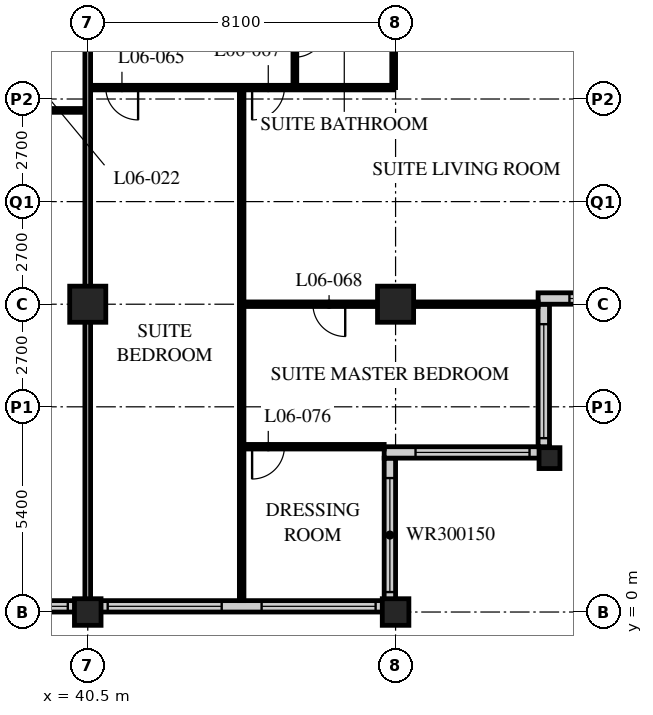
"""IFC4 building model, lengths in metres.
Left out: names, types, materials, properties, quantities, classifications, styles, units other than length and angle.
Written with IfcOpenShell. Run it as: python <this file> out.ifc"""

import sys

from ifc_helpers import new_model, si_unit, direction, frame, frame_2d, origin, origin_2d, place, context, subcontext, project, spatial, rectangle, hollow_rectangle, extrude, element, fill, save


model = new_model("IFC4")
c1 = context("Model", 3, precision=1e-05, world=origin(), true_north=direction((0.0, 1.0)))
c2 = subcontext(c1, "Body", "Model", "MODEL_VIEW")
j1 = project(units=[si_unit("LENGTHUNIT", "METRE"), si_unit("PLANEANGLEUNIT", "RADIAN")], contexts=[c1])
p1 = place(None, origin())
s1 = spatial("IfcSite", under=j1, at=p1, CompositionType="ELEMENT")
p2 = place(p1, origin())
s2 = spatial("IfcBuilding", under=s1, at=p2, CompositionType="ELEMENT")
p3 = place(p2, frame((0.0, 0.0, 33.0)))
s3 = spatial("IfcBuildingStorey", under=s2, at=p3, CompositionType="ELEMENT", Elevation=33.0)
p4 = place(p3, frame((40.5, 0.0, 0.0), z_axis=(0.0, 0.0, 1.0), x_axis=(1.0, 0.0, 0.0)))
e1 = element("IfcColumn", 1, at=p4, inside=s3, PredefinedType="COLUMN", context=c2, shape_type="SweptSolid", body=[
    extrude(hollow_rectangle(XDim=0.7, YDim=0.7, WallThickness=0.06, at=origin_2d()), origin(), (0.0, 0.0, 1.0), 3.4),
])
p5 = place(p3, frame((40.5, 8.1, 0.0), z_axis=(0.0, 0.0, 1.0), x_axis=(1.0, 0.0, 0.0)))
e2 = element("IfcColumn", 2, at=p5, inside=s3, PredefinedType="COLUMN", context=c2, shape_type="SweptSolid", body=[
    extrude(hollow_rectangle(XDim=0.95, YDim=0.95, WallThickness=0.095, at=origin_2d()), origin(), (0.0, 0.0, 1.0), 3.4),
])
p6 = place(p3, frame((48.6, 0.0, 0.0), z_axis=(0.0, 0.0, 1.0), x_axis=(1.0, 0.0, 0.0)))
e3 = element("IfcColumn", 3, at=p6, inside=s3, PredefinedType="COLUMN", context=c2, shape_type="SweptSolid", body=[
    extrude(hollow_rectangle(XDim=0.7, YDim=0.7, WallThickness=0.06, at=origin_2d()), origin(), (0.0, 0.0, 1.0), 3.4),
])
p7 = place(p3, frame((48.6, 8.1, 0.0), z_axis=(0.0, 0.0, 1.0), x_axis=(1.0, 0.0, 0.0)))
e4 = element("IfcColumn", 4, at=p7, inside=s3, PredefinedType="COLUMN", context=c2, shape_type="SweptSolid", body=[
    extrude(hollow_rectangle(XDim=0.95, YDim=0.95, WallThickness=0.095, at=origin_2d()), origin(), (0.0, 0.0, 1.0), 3.4),
])
p8 = place(p3, frame((52.65, 4.05, 0.0), z_axis=(0.0, 0.0, 1.0), x_axis=(1.0, 0.0, 0.0)))
e5 = element("IfcColumn", 5, at=p8, inside=s3, PredefinedType="COLUMN", context=c2, shape_type="SweptSolid", body=[
    extrude(hollow_rectangle(XDim=0.55, YDim=0.55, WallThickness=0.05, at=origin_2d()), origin(), (0.0, 0.0, 1.0), 3.4),
])
p9 = place(p3, frame((8.4, 0.15, 0.0), z_axis=(0.0, 0.0, 1.0), x_axis=(1.0, 0.0, 0.0)))
e6 = element("IfcWall", 6, at=p9, inside=s3, PredefinedType="SOLIDWALL", context=c2, shape_type="SweptSolid", body=[
    extrude(rectangle(XDim=40.2, YDim=0.3, at=frame_2d((20.1, 0.0))), origin(), (0.0, 0.0, 1.0), 3.19),
])
p10 = place(p9, frame((0.225, 0.0, 0.9)))
e7 = element("IfcOpeningElement", 7, at=p10, cuts=e6, PredefinedType="OPENING", context=c2, shape_type="SweptSolid", body=[
    extrude(rectangle(XDim=3.0, YDim=2.0, at=frame_2d((1.5, 1.0))), frame((0.0, 0.16, 0.0), z_axis=(0.0, -1.0, 0.0), x_axis=(1.0, 0.0, 0.0)), (0.0, 0.0, 1.0), 0.32),
])
p11 = place(p9, frame((4.275, 0.0, 0.9)))
e8 = element("IfcOpeningElement", 8, at=p11, cuts=e6, PredefinedType="OPENING", context=c2, shape_type="SweptSolid", body=[
    extrude(rectangle(XDim=3.0, YDim=2.0, at=frame_2d((1.5, 1.0))), frame((0.0, 0.16, 0.0), z_axis=(0.0, -1.0, 0.0), x_axis=(1.0, 0.0, 0.0)), (0.0, 0.0, 1.0), 0.32),
])
p12 = place(p9, frame((8.325, 0.0, 0.9)))
e9 = element("IfcOpeningElement", 9, at=p12, cuts=e6, PredefinedType="OPENING", context=c2, shape_type="SweptSolid", body=[
    extrude(rectangle(XDim=3.0, YDim=2.0, at=frame_2d((1.5, 1.0))), frame((0.0, 0.16, 0.0), z_axis=(0.0, -1.0, 0.0), x_axis=(1.0, 0.0, 0.0)), (0.0, 0.0, 1.0), 0.32),
])
p13 = place(p9, frame((12.375, 0.0, 0.9)))
e10 = element("IfcOpeningElement", 10, at=p13, cuts=e6, PredefinedType="OPENING", context=c2, shape_type="SweptSolid", body=[
    extrude(rectangle(XDim=3.0, YDim=2.0, at=frame_2d((1.5, 1.0))), frame((0.0, 0.16, 0.0), z_axis=(0.0, -1.0, 0.0), x_axis=(1.0, 0.0, 0.0)), (0.0, 0.0, 1.0), 0.32),
])
p14 = place(p9, frame((16.425, 0.0, 0.9)))
e11 = element("IfcOpeningElement", 11, at=p14, cuts=e6, PredefinedType="OPENING", context=c2, shape_type="SweptSolid", body=[
    extrude(rectangle(XDim=3.0, YDim=2.0, at=frame_2d((1.5, 1.0))), frame((0.0, 0.16, 0.0), z_axis=(0.0, -1.0, 0.0), x_axis=(1.0, 0.0, 0.0)), (0.0, 0.0, 1.0), 0.32),
])
p15 = place(p9, frame((20.475, 0.0, 0.9)))
e12 = element("IfcOpeningElement", 12, at=p15, cuts=e6, PredefinedType="OPENING", context=c2, shape_type="SweptSolid", body=[
    extrude(rectangle(XDim=3.0, YDim=2.0, at=frame_2d((1.5, 1.0))), frame((0.0, 0.16, 0.0), z_axis=(0.0, -1.0, 0.0), x_axis=(1.0, 0.0, 0.0)), (0.0, 0.0, 1.0), 0.32),
])
p16 = place(p9, frame((24.525, 0.0, 0.9)))
e13 = element("IfcOpeningElement", 13, at=p16, cuts=e6, PredefinedType="OPENING", context=c2, shape_type="SweptSolid", body=[
    extrude(rectangle(XDim=3.0, YDim=2.0, at=frame_2d((1.5, 1.0))), frame((0.0, 0.16, 0.0), z_axis=(0.0, -1.0, 0.0), x_axis=(1.0, 0.0, 0.0)), (0.0, 0.0, 1.0), 0.32),
])
p17 = place(p9, frame((28.575, 0.0, 0.9)))
e14 = element("IfcOpeningElement", 14, at=p17, cuts=e6, PredefinedType="OPENING", context=c2, shape_type="SweptSolid", body=[
    extrude(rectangle(XDim=3.0, YDim=2.0, at=frame_2d((1.5, 1.0))), frame((0.0, 0.16, 0.0), z_axis=(0.0, -1.0, 0.0), x_axis=(1.0, 0.0, 0.0)), (0.0, 0.0, 1.0), 0.32),
])
p18 = place(p9, frame((32.625, 0.0, 0.9)))
e15 = element("IfcOpeningElement", 15, at=p18, cuts=e6, PredefinedType="OPENING", context=c2, shape_type="SweptSolid", body=[
    extrude(rectangle(XDim=3.0, YDim=2.0, at=frame_2d((1.5, 1.0))), frame((0.0, 0.16, 0.0), z_axis=(0.0, -1.0, 0.0), x_axis=(1.0, 0.0, 0.0)), (0.0, 0.0, 1.0), 0.32),
])
p19 = place(p9, frame((36.675, 0.0, 0.9)))
e16 = element("IfcOpeningElement", 16, at=p19, cuts=e6, PredefinedType="OPENING", context=c2, shape_type="SweptSolid", body=[
    extrude(rectangle(XDim=3.0, YDim=2.0, at=frame_2d((1.5, 1.0))), frame((0.0, 0.16, 0.0), z_axis=(0.0, -1.0, 0.0), x_axis=(1.0, 0.0, 0.0)), (0.0, 0.0, 1.0), 0.32),
])
p20 = place(p3, frame((48.45, 0.3, 0.0), z_axis=(0.0, 0.0, 1.0), x_axis=(0.0, 1.0, 0.0)))
e17 = element("IfcWall", 17, at=p20, inside=s3, PredefinedType="SOLIDWALL", context=c2, shape_type="SweptSolid", body=[
    extrude(rectangle(XDim=3.75, YDim=0.3, at=frame_2d((1.875, 0.0))), origin(), (0.0, 0.0, 1.0), 3.19),
])
p21 = place(p20, frame((0.225, 0.0, 0.9)))
e18 = element("IfcOpeningElement", 18, at=p21, cuts=e17, PredefinedType="OPENING", context=c2, shape_type="SweptSolid", body=[
    extrude(rectangle(XDim=3.0, YDim=1.5, at=frame_2d((1.5, 0.75))), frame((0.0, 0.16, 0.0), z_axis=(0.0, -1.0, 0.0), x_axis=(1.0, 0.0, 0.0)), (0.0, 0.0, 1.0), 0.32),
])
p22 = place(p3, frame((48.3, 4.2, 0.0), z_axis=(0.0, 0.0, 1.0), x_axis=(1.0, 0.0, 0.0)))
e19 = element("IfcWall", 19, at=p22, inside=s3, PredefinedType="SOLIDWALL", context=c2, shape_type="SweptSolid", body=[
    extrude(rectangle(XDim=4.35, YDim=0.3, at=frame_2d((2.175, 0.0))), origin(), (0.0, 0.0, 1.0), 3.19),
])
p23 = place(p22, frame((0.825, 0.0, 0.9)))
e20 = element("IfcOpeningElement", 20, at=p23, cuts=e19, PredefinedType="OPENING", context=c2, shape_type="SweptSolid", body=[
    extrude(rectangle(XDim=3.0, YDim=1.5, at=frame_2d((1.5, 0.75))), frame((0.0, 0.16, 0.0), z_axis=(0.0, -1.0, 0.0), x_axis=(1.0, 0.0, 0.0)), (0.0, 0.0, 1.0), 0.32),
])
p24 = place(p3, frame((52.5, 4.35, 0.0), z_axis=(0.0, 0.0, 1.0), x_axis=(0.0, 1.0, 0.0)))
e21 = element("IfcWall", 21, at=p24, inside=s3, PredefinedType="SOLIDWALL", context=c2, shape_type="SweptSolid", body=[
    extrude(rectangle(XDim=3.75, YDim=0.3, at=frame_2d((1.875, 0.0))), origin(), (0.0, 0.0, 1.0), 3.19),
])
p25 = place(p24, frame((0.225, 0.0, 0.9)))
e22 = element("IfcOpeningElement", 22, at=p25, cuts=e21, PredefinedType="OPENING", context=c2, shape_type="SweptSolid", body=[
    extrude(rectangle(XDim=3.0, YDim=1.5, at=frame_2d((1.5, 0.75))), frame((0.0, 0.16, 0.0), z_axis=(0.0, -1.0, 0.0), x_axis=(1.0, 0.0, 0.0)), (0.0, 0.0, 1.0), 0.32),
])
p26 = place(p3, frame((52.35, 8.25, 0.0), z_axis=(0.0, 0.0, 1.0), x_axis=(1.0, 0.0, 0.0)))
e23 = element("IfcWall", 23, at=p26, inside=s3, PredefinedType="SOLIDWALL", context=c2, shape_type="SweptSolid", body=[
    extrude(rectangle(XDim=4.35, YDim=0.3, at=frame_2d((2.175, 0.0))), origin(), (0.0, 0.0, 1.0), 3.19),
])
p27 = place(p26, frame((0.825, 0.0, 0.9)))
e24 = element("IfcOpeningElement", 24, at=p27, cuts=e23, PredefinedType="OPENING", context=c2, shape_type="SweptSolid", body=[
    extrude(rectangle(XDim=3.0, YDim=1.5, at=frame_2d((1.5, 0.75))), frame((0.0, 0.16, 0.0), z_axis=(0.0, -1.0, 0.0), x_axis=(1.0, 0.0, 0.0)), (0.0, 0.0, 1.0), 0.32),
])
p28 = place(p3, frame((37.9, 13.2, 0.0), z_axis=(0.0, 0.0, 1.0), x_axis=(1.0, 0.0, 0.0)))
e25 = element("IfcWall", 25, at=p28, inside=s3, PredefinedType="PARTITIONING", context=c2, shape_type="SweptSolid", body=[
    extrude(rectangle(XDim=2.6, YDim=0.1, at=frame_2d((1.3, 0.0))), origin(), (0.0, 0.0, 1.0), 3.19),
])
p29 = place(p3, frame((40.5, 13.8, 0.0), z_axis=(0.0, 0.0, 1.0), x_axis=(1.0, 0.0, 0.0)))
e26 = element("IfcWall", 26, at=p29, inside=s3, PredefinedType="PARTITIONING", context=c2, shape_type="SweptSolid", body=[
    extrude(rectangle(XDim=8.05, YDim=0.12, at=frame_2d((4.025, 0.0))), origin(), (0.0, 0.0, 1.0), 3.19),
])
p30 = place(p29, frame((0.475, 0.0, 0.0)))
e27 = element("IfcOpeningElement", 27, at=p30, cuts=e26, PredefinedType="OPENING", context=c2, shape_type="SweptSolid", body=[
    extrude(rectangle(XDim=0.85, YDim=2.1, at=frame_2d((0.425, 1.05))), frame((0.0, 0.07, 0.0), z_axis=(0.0, -1.0, 0.0), x_axis=(1.0, 0.0, 0.0)), (0.0, 0.0, 1.0), 0.14),
])
p31 = place(p29, frame((4.325, 0.0, 0.0)))
e28 = element("IfcOpeningElement", 28, at=p31, cuts=e26, PredefinedType="OPENING", context=c2, shape_type="SweptSolid", body=[
    extrude(rectangle(XDim=0.85, YDim=2.1, at=frame_2d((0.425, 1.05))), frame((0.0, 0.07, 0.0), z_axis=(0.0, -1.0, 0.0), x_axis=(1.0, 0.0, 0.0)), (0.0, 0.0, 1.0), 0.14),
])
p32 = place(p3, frame((45.95, 16.2, 0.0), z_axis=(0.0, 0.0, 1.0), x_axis=(0.0, -1.0, 0.0)))
e29 = element("IfcWall", 29, at=p32, inside=s3, PredefinedType="PARTITIONING", context=c2, shape_type="SweptSolid", body=[
    extrude(rectangle(XDim=2.4, YDim=0.1, at=frame_2d((1.2, 0.0))), origin(), (0.0, 0.0, 1.0), 3.19),
])
p33 = place(p32, frame((0.8, 0.0, 0.0)))
e30 = element("IfcOpeningElement", 30, at=p33, cuts=e29, PredefinedType="OPENING", context=c2, shape_type="SweptSolid", body=[
    extrude(rectangle(XDim=0.8, YDim=2.1, at=frame_2d((0.4, 1.05))), frame((0.0, 0.06, 0.0), z_axis=(0.0, -1.0, 0.0), x_axis=(1.0, 0.0, 0.0)), (0.0, 0.0, 1.0), 0.12),
])
p34 = place(p3, frame((48.55, 16.2, 0.0), z_axis=(0.0, 0.0, 1.0), x_axis=(0.0, -1.0, 0.0)))
e31 = element("IfcWall", 31, at=p34, inside=s3, PredefinedType="PARTITIONING", context=c2, shape_type="SweptSolid", body=[
    extrude(rectangle(XDim=2.4, YDim=0.1, at=frame_2d((1.2, 0.0))), origin(), (0.0, 0.0, 1.0), 2.578),
])
p35 = place(p3, frame((44.55, 13.8, 0.0), z_axis=(0.0, 0.0, 1.0), x_axis=(0.0, -1.0, 0.0)))
e32 = element("IfcWall", 32, at=p35, inside=s3, PredefinedType="PARTITIONING", context=c2, shape_type="SweptSolid", body=[
    extrude(rectangle(XDim=13.5, YDim=0.12, at=frame_2d((6.75, 0.0))), origin(), (0.0, 0.0, 1.0), 3.19),
])
p36 = place(p3, frame((44.55, 8.1, 0.0), z_axis=(0.0, 0.0, 1.0), x_axis=(1.0, 0.0, 0.0)))
e33 = element("IfcWall", 33, at=p36, inside=s3, PredefinedType="PARTITIONING", context=c2, shape_type="SweptSolid", body=[
    extrude(rectangle(XDim=7.8, YDim=0.12, at=frame_2d((3.9, 0.0))), origin(), (0.0, 0.0, 1.0), 2.578),
])
p37 = place(p36, frame((1.875, 0.0, 0.0)))
e34 = element("IfcOpeningElement", 34, at=p37, cuts=e33, PredefinedType="OPENING", context=c2, shape_type="SweptSolid", body=[
    extrude(rectangle(XDim=0.85, YDim=2.1, at=frame_2d((0.425, 1.05))), frame((0.0, 0.07, 0.0), z_axis=(0.0, -1.0, 0.0), x_axis=(1.0, 0.0, 0.0)), (0.0, 0.0, 1.0), 0.14),
])
p38 = place(p3, frame((40.5, 16.2, 0.0), z_axis=(0.0, 0.0, 1.0), x_axis=(0.0, -1.0, 0.0)))
e35 = element("IfcWall", 35, at=p38, inside=s3, PredefinedType="PARTITIONING", context=c2, shape_type="SweptSolid", body=[
    extrude(rectangle(XDim=15.9, YDim=0.15, at=frame_2d((7.95, 0.0))), origin(), (0.0, 0.0, 1.0), 2.578),
])
p39 = place(p3, frame((44.55, 4.35, 0.0), z_axis=(0.0, 0.0, 1.0), x_axis=(1.0, 0.0, 0.0)))
e36 = element("IfcWall", 36, at=p39, inside=s3, PredefinedType="PARTITIONING", context=c2, shape_type="SweptSolid", body=[
    extrude(rectangle(XDim=3.75, YDim=0.12, at=frame_2d((1.875, 0.0))), origin(), (0.0, 0.0, 1.0), 3.19),
])
p40 = place(p39, frame((0.275, 0.0, 0.0)))
e37 = element("IfcOpeningElement", 37, at=p40, cuts=e36, PredefinedType="OPENING", context=c2, shape_type="SweptSolid", body=[
    extrude(rectangle(XDim=0.85, YDim=2.1, at=frame_2d((0.425, 1.05))), frame((0.0, 0.07, 0.0), z_axis=(0.0, -1.0, 0.0), x_axis=(1.0, 0.0, 0.0)), (0.0, 0.0, 1.0), 0.14),
])
p41 = place(p17, origin())
e38 = element("IfcWindow", 38, at=p41, inside=s3, PartitioningType="SINGLE_PANEL", PredefinedType="WINDOW", context=c2, shape_type="SweptSolid", body=[
    extrude(rectangle(XDim=3.0, YDim=2.0, at=frame_2d((1.5, 1.0))), frame((0.0, 0.03, 0.0), z_axis=(0.0, -1.0, 0.0), x_axis=(1.0, 0.0, 0.0)), (0.0, 0.0, 1.0), 0.06),
])
fill(e14, e38)
p42 = place(p18, origin())
e39 = element("IfcWindow", 39, at=p42, inside=s3, PartitioningType="SINGLE_PANEL", PredefinedType="WINDOW", context=c2, shape_type="SweptSolid", body=[
    extrude(rectangle(XDim=3.0, YDim=2.0, at=frame_2d((1.5, 1.0))), frame((0.0, 0.03, 0.0), z_axis=(0.0, -1.0, 0.0), x_axis=(1.0, 0.0, 0.0)), (0.0, 0.0, 1.0), 0.06),
])
fill(e15, e39)
p43 = place(p19, origin())
e40 = element("IfcWindow", 40, at=p43, inside=s3, PartitioningType="SINGLE_PANEL", PredefinedType="WINDOW", context=c2, shape_type="SweptSolid", body=[
    extrude(rectangle(XDim=3.0, YDim=2.0, at=frame_2d((1.5, 1.0))), frame((0.0, 0.03, 0.0), z_axis=(0.0, -1.0, 0.0), x_axis=(1.0, 0.0, 0.0)), (0.0, 0.0, 1.0), 0.06),
])
fill(e16, e40)
p44 = place(p21, origin())
e41 = element("IfcWindow", 41, at=p44, inside=s3, PartitioningType="SINGLE_PANEL", PredefinedType="WINDOW", context=c2, shape_type="SweptSolid", body=[
    extrude(rectangle(XDim=3.0, YDim=1.5, at=frame_2d((1.5, 0.75))), frame((0.0, 0.03, 0.0), z_axis=(0.0, -1.0, 0.0), x_axis=(1.0, 0.0, 0.0)), (0.0, 0.0, 1.0), 0.06),
])
fill(e18, e41)
p45 = place(p23, origin())
e42 = element("IfcWindow", 42, at=p45, inside=s3, PartitioningType="SINGLE_PANEL", PredefinedType="WINDOW", context=c2, shape_type="SweptSolid", body=[
    extrude(rectangle(XDim=3.0, YDim=1.5, at=frame_2d((1.5, 0.75))), frame((0.0, 0.03, 0.0), z_axis=(0.0, -1.0, 0.0), x_axis=(1.0, 0.0, 0.0)), (0.0, 0.0, 1.0), 0.06),
])
fill(e20, e42)
p46 = place(p25, origin())
e43 = element("IfcWindow", 43, at=p46, inside=s3, PartitioningType="SINGLE_PANEL", PredefinedType="WINDOW", context=c2, shape_type="SweptSolid", body=[
    extrude(rectangle(XDim=3.0, YDim=1.5, at=frame_2d((1.5, 0.75))), frame((0.0, 0.03, 0.0), z_axis=(0.0, -1.0, 0.0), x_axis=(1.0, 0.0, 0.0)), (0.0, 0.0, 1.0), 0.06),
])
fill(e22, e43)
p47 = place(p27, origin())
e44 = element("IfcWindow", 44, at=p47, inside=s3, PartitioningType="SINGLE_PANEL", PredefinedType="WINDOW", context=c2, shape_type="SweptSolid", body=[
    extrude(rectangle(XDim=3.0, YDim=1.5, at=frame_2d((1.5, 0.75))), frame((0.0, 0.03, 0.0), z_axis=(0.0, -1.0, 0.0), x_axis=(1.0, 0.0, 0.0)), (0.0, 0.0, 1.0), 0.06),
])
fill(e24, e44)
p48 = place(p30, origin())
e45 = element("IfcDoor", 45, at=p48, inside=s3, OperationType="SINGLE_SWING_LEFT", PredefinedType="DOOR", context=c2, shape_type="SweptSolid", body=[
    extrude(rectangle(XDim=0.85, YDim=2.1, at=frame_2d((0.425, 1.05))), frame((0.0, 0.025, 0.0), z_axis=(0.0, -1.0, 0.0), x_axis=(1.0, 0.0, 0.0)), (0.0, 0.0, 1.0), 0.05),
])
fill(e27, e45)
p49 = place(p33, origin())
e46 = element("IfcDoor", 46, at=p49, inside=s3, OperationType="SINGLE_SWING_LEFT", PredefinedType="DOOR", context=c2, shape_type="SweptSolid", body=[
    extrude(rectangle(XDim=0.8, YDim=2.1, at=frame_2d((0.4, 1.05))), frame((0.0, 0.025, 0.0), z_axis=(0.0, -1.0, 0.0), x_axis=(1.0, 0.0, 0.0)), (0.0, 0.0, 1.0), 0.05),
])
fill(e30, e46)
p50 = place(p31, origin())
e47 = element("IfcDoor", 47, at=p50, inside=s3, OperationType="SINGLE_SWING_RIGHT", PredefinedType="DOOR", context=c2, shape_type="SweptSolid", body=[
    extrude(rectangle(XDim=0.85, YDim=2.1, at=frame_2d((0.425, 1.05))), frame((0.0, 0.025, 0.0), z_axis=(0.0, -1.0, 0.0), x_axis=(1.0, 0.0, 0.0)), (0.0, 0.0, 1.0), 0.05),
])
fill(e28, e47)
p51 = place(p37, origin())
e48 = element("IfcDoor", 48, at=p51, inside=s3, OperationType="SINGLE_SWING_LEFT", PredefinedType="DOOR", context=c2, shape_type="SweptSolid", body=[
    extrude(rectangle(XDim=0.85, YDim=2.1, at=frame_2d((0.425, 1.05))), frame((0.0, 0.025, 0.0), z_axis=(0.0, -1.0, 0.0), x_axis=(1.0, 0.0, 0.0)), (0.0, 0.0, 1.0), 0.05),
])
fill(e34, e48)
p52 = place(p40, origin())
e49 = element("IfcDoor", 49, at=p52, inside=s3, OperationType="SINGLE_SWING_RIGHT", PredefinedType="DOOR", context=c2, shape_type="SweptSolid", body=[
    extrude(rectangle(XDim=0.85, YDim=2.1, at=frame_2d((0.425, 1.05))), frame((0.0, 0.025, 0.0), z_axis=(0.0, -1.0, 0.0), x_axis=(1.0, 0.0, 0.0)), (0.0, 0.0, 1.0), 0.05),
])
fill(e37, e49)
save(model, sys.argv[1])
